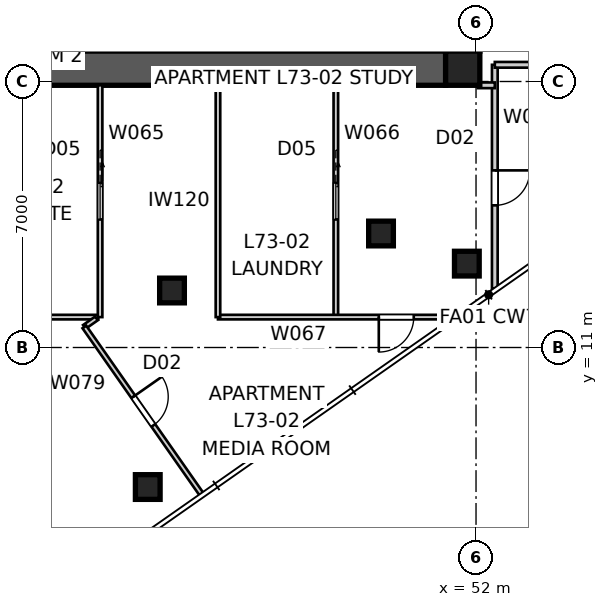
"""IFC4 building model, lengths in metres.
Left out: names, types, materials, properties, quantities, classifications, styles, units other than length and angle.
Written with IfcOpenShell. Run it as: python <this file> out.ifc"""

import sys

from ifc_helpers import new_model, si_unit, direction, frame, frame_2d, origin, origin_2d, place, context, subcontext, project, spatial, polyline, rectangle, outline, extrude, element, fill, save


model = new_model("IFC4")
c1 = context("Model", 3, precision=1e-05, world=origin(), true_north=direction((0.0, 1.0)))
c2 = subcontext(c1, "Body", "Model", "MODEL_VIEW")
j1 = project(units=[si_unit("LENGTHUNIT", "METRE"), si_unit("PLANEANGLEUNIT", "RADIAN")], contexts=[c1])
p1 = place(None, origin())
s1 = spatial("IfcSite", under=j1, at=p1, CompositionType="ELEMENT")
p2 = place(p1, origin())
s2 = spatial("IfcBuilding", under=s1, at=p2, CompositionType="ELEMENT")
p3 = place(p2, frame((0.0, 0.0, 264.2)))
s3 = spatial("IfcBuildingStorey", under=s2, at=p3, CompositionType="ELEMENT", Elevation=264.2)
p4 = place(p3, frame((51.2, 18.35, 0.0), z_axis=(0.0, 0.0, 1.0), x_axis=(-1.0, 0.0, 0.0)))
e1 = element("IfcWall", 1, at=p4, inside=s3, PredefinedType="SHEAR", context=c2, shape_type="SweptSolid", body=[
    extrude(outline(polyline([(0.0, -0.45), (22.4, -0.45), (22.4, -0.025), (22.85, -0.025), (22.85, 0.025), (22.4, 0.025), (22.4, 0.45), (0.0, 0.45), (0.0, 0.025), (-0.45, 0.025), (-0.45, -0.025), (0.0, -0.025), (0.0, -0.45)])), origin(), (0.0, 0.0, 1.0), 3.4),
])
p5 = place(p3, frame((51.65, 18.8, 0.0), z_axis=(0.0, 0.0, 1.0), x_axis=(0.0, 1.0, 0.0)))
e2 = element("IfcWall", 2, at=p5, inside=s3, PredefinedType="SHEAR", context=c2, shape_type="SweptSolid", body=[
    extrude(outline(polyline([(0.0, -0.45), (22.4, -0.45), (22.4, -0.025), (22.85, -0.025), (22.85, 0.025), (22.4, 0.025), (22.4, 0.45), (0.0, 0.45), (0.0, 0.025), (-0.45, 0.025), (-0.45, -0.025), (0.0, -0.025), (0.0, -0.45)])), origin(), (0.0, 0.0, 1.0), 3.4),
])
p6 = place(p5, frame((11.14, 0.0, 0.0)))
e3 = element("IfcOpeningElement", 3, at=p6, cuts=e2, PredefinedType="OPENING", context=c2, shape_type="SweptSolid", body=[
    extrude(rectangle(XDim=1.02, YDim=2.4, at=frame_2d((0.51, 1.2))), frame((0.0, 0.46, 0.0), z_axis=(0.0, -1.0, 0.0), x_axis=(1.0, 0.0, 0.0)), (0.0, 0.0, 1.0), 0.92),
])
p7 = place(p3, frame((51.65, 18.35, 0.0), z_axis=(0.0, 0.0, 1.0), x_axis=(1.0, 0.0, 0.0)))
e4 = element("IfcColumn", 4, at=p7, inside=s3, PredefinedType="COLUMN", context=c2, shape_type="SweptSolid", body=[
    extrude(rectangle(XDim=0.9, YDim=0.9, at=origin_2d()), origin(), (0.0, 0.0, 1.0), 3.4),
])
for number, where, z_axis, x_axis in (
    (5, (43.362, 7.328, 0.0), (0.0, 0.0, 1.0), (1.0, 0.0, 0.0)),
    (6, (51.758, 13.207, 0.0), (0.0, 0.0, 1.0), (1.0, 0.0, 0.0)),
):
    element("IfcColumn", number, at=place(p3, frame(where, z_axis=z_axis, x_axis=x_axis)), inside=s3, PredefinedType="COLUMN", context=c2, shape_type="SweptSolid", body=[
        extrude(rectangle(XDim=0.65, YDim=0.65, at=origin_2d()), origin(), (0.0, 0.0, 1.0), 3.2),
    ])
for number, where, z_axis, x_axis in (
    (7, (44.0, 12.5, 0.0), (0.0, 0.0, 1.0), (1.0, 0.0, 0.0)),
    (8, (49.5, 14.0, 0.0), (0.0, 0.0, 1.0), (1.0, 0.0, 0.0)),
):
    element("IfcColumn", number, at=place(p3, frame(where, z_axis=z_axis, x_axis=x_axis)), inside=s3, PredefinedType="COLUMN", context=c2, shape_type="SweptSolid", body=[
        extrude(rectangle(XDim=0.65, YDim=0.65, at=origin_2d()), origin(), (0.0, 0.0, 1.0), 3.4),
    ])
p8 = place(p3, frame((42.062, 11.8, 0.0), z_axis=(0.0, 0.0, 1.0), x_axis=(-1.0, 0.0, 0.0)))
e9 = element("IfcWall", 9, at=p8, inside=s3, PredefinedType="PARTITIONING", context=c2, shape_type="SweptSolid", body=[
    extrude(rectangle(XDim=7.243, YDim=0.12, at=frame_2d((3.621, 0.0))), origin(), (0.0, 0.0, 1.0), 3.2),
])
p9 = place(p3, frame((42.108, 17.9, 0.0), z_axis=(0.0, 0.0, 1.0), x_axis=(0.0, -1.0, 0.0)))
e10 = element("IfcWall", 10, at=p9, inside=s3, PredefinedType="PARTITIONING", context=c2, shape_type="SweptSolid", body=[
    extrude(rectangle(XDim=6.1, YDim=0.12, at=frame_2d((3.05, 0.0))), origin(), (0.0, 0.0, 1.0), 3.2),
])
p10 = place(p9, frame((2.57, 0.0, 0.0)))
e11 = element("IfcOpeningElement", 11, at=p10, cuts=e10, PredefinedType="OPENING", context=c2, shape_type="SweptSolid", body=[
    extrude(rectangle(XDim=0.96, YDim=2.1, at=frame_2d((0.48, 1.05))), frame((0.0, 0.07, 0.0), z_axis=(0.0, -1.0, 0.0), x_axis=(1.0, 0.0, 0.0)), (0.0, 0.0, 1.0), 0.14),
])
p11 = place(p3, frame((48.311, 17.9, 0.0), z_axis=(0.0, 0.0, 1.0), x_axis=(0.0, -1.0, 0.0)))
e12 = element("IfcWall", 12, at=p11, inside=s3, PredefinedType="PARTITIONING", context=c2, shape_type="SweptSolid", body=[
    extrude(rectangle(XDim=6.1, YDim=0.12, at=frame_2d((3.05, 0.0))), origin(), (0.0, 0.0, 1.0), 3.2),
])
p12 = place(p11, frame((2.57, 0.0, 0.0)))
e13 = element("IfcOpeningElement", 13, at=p12, cuts=e12, PredefinedType="OPENING", context=c2, shape_type="SweptSolid", body=[
    extrude(rectangle(XDim=0.96, YDim=2.1, at=frame_2d((0.48, 1.05))), frame((0.0, 0.07, 0.0), z_axis=(0.0, -1.0, 0.0), x_axis=(1.0, 0.0, 0.0)), (0.0, 0.0, 1.0), 0.14),
])
p13 = place(p3, frame((51.422, 11.8, 0.0), z_axis=(0.0, 0.0, 1.0), x_axis=(-1.0, 0.0, 0.0)))
e14 = element("IfcWall", 14, at=p13, inside=s3, PredefinedType="PARTITIONING", context=c2, shape_type="SweptSolid", body=[
    extrude(rectangle(XDim=6.213, YDim=0.12, at=frame_2d((3.106, 0.0))), origin(), (0.0, 0.0, 1.0), 3.2),
])
p14 = place(p13, frame((1.061, 0.0, 0.0)))
e15 = element("IfcOpeningElement", 15, at=p14, cuts=e14, PredefinedType="OPENING", context=c2, shape_type="SweptSolid", body=[
    extrude(rectangle(XDim=0.92, YDim=2.1, at=frame_2d((0.46, 1.05))), frame((0.0, 0.07, 0.0), z_axis=(0.0, -1.0, 0.0), x_axis=(1.0, 0.0, 0.0)), (0.0, 0.0, 1.0), 0.14),
])
p15 = place(p3, frame((45.209, 11.8, 0.0), z_axis=(0.0, 0.0, 1.0), x_axis=(0.0, 1.0, 0.0)))
e16 = element("IfcWall", 16, at=p15, inside=s3, PredefinedType="PARTITIONING", context=c2, shape_type="SweptSolid", body=[
    extrude(rectangle(XDim=6.1, YDim=0.12, at=frame_2d((3.05, 0.0))), origin(), (0.0, 0.0, 1.0), 3.2),
])
p16 = place(p3, frame((52.494, 18.439, 0.0), z_axis=(0.0, 0.0, 1.0), x_axis=(0.0, -1.0, 0.0)))
e17 = element("IfcWall", 17, at=p16, inside=s3, PredefinedType="SOLIDWALL", context=c2, shape_type="SweptSolid", body=[
    extrude(rectangle(XDim=5.888, YDim=0.15, at=frame_2d((2.944, 0.0))), origin(), (0.0, 0.0, 1.0), 3.2),
])
p17 = place(p16, frame((2.778, 0.0, 0.0)))
e18 = element("IfcOpeningElement", 18, at=p17, cuts=e17, PredefinedType="OPENING", context=c2, shape_type="SweptSolid", body=[
    extrude(rectangle(XDim=0.92, YDim=2.34, at=frame_2d((0.46, 1.17))), frame((0.0, 0.085, 0.0), z_axis=(0.0, -1.0, 0.0), x_axis=(1.0, 0.0, 0.0)), (0.0, 0.0, 1.0), 0.17),
])
p18 = place(p3, frame((52.05, 17.9, 0.0), z_axis=(0.0, 0.0, 1.0), x_axis=(1.0, 0.0, 0.0)))
e19 = element("IfcWall", 19, at=p18, inside=s3, PredefinedType="SOLIDWALL", context=c2, shape_type="SweptSolid", body=[
    extrude(rectangle(XDim=0.444, YDim=0.15, at=frame_2d((0.222, 0.0))), origin(), (0.0, 0.0, 1.0), 3.2),
])
p19 = place(p3, frame((52.494, 18.439, 0.0), z_axis=(0.0, 0.0, 1.0), x_axis=(1.0, 0.0, 0.0)))
e20 = element("IfcWall", 20, at=p19, inside=s3, PredefinedType="SOLIDWALL", context=c2, shape_type="SweptSolid", body=[
    extrude(rectangle(XDim=5.706, YDim=0.15, at=frame_2d((2.853, 0.0))), origin(), (0.0, 0.0, 1.0), 3.2),
])
p20 = place(p19, frame((2.393, 0.0, 0.0)))
e21 = element("IfcOpeningElement", 21, at=p20, cuts=e20, PredefinedType="OPENING", context=c2, shape_type="SweptSolid", body=[
    extrude(rectangle(XDim=0.92, YDim=2.34, at=frame_2d((0.46, 1.17))), frame((0.0, 0.085, 0.0), z_axis=(0.0, -1.0, 0.0), x_axis=(1.0, 0.0, 0.0)), (0.0, 0.0, 1.0), 0.17),
])
p21 = place(p3, frame((41.558, 4.893, 0.0), z_axis=(0.0, 0.0, 1.0), x_axis=(-0.573576357466, 0.819152099525, 0.0)))
e22 = element("IfcWall", 22, at=p21, inside=s3, PredefinedType="PARTITIONING", context=c2, shape_type="SweptSolid", body=[
    extrude(rectangle(XDim=8.335, YDim=0.12, at=frame_2d((4.167, 0.0))), origin(), (0.0, 0.0, 1.0), 3.2),
])
p22 = place(p21, frame((1.942, 0.0, 0.0)))
e23 = element("IfcOpeningElement", 23, at=p22, cuts=e22, PredefinedType="OPENING", context=c2, shape_type="SweptSolid", body=[
    extrude(rectangle(XDim=0.92, YDim=2.34, at=frame_2d((0.46, 1.17))), frame((0.0, 0.07, 0.0), z_axis=(0.0, -1.0, 0.0), x_axis=(1.0, 0.0, 0.0)), (0.0, 0.0, 1.0), 0.14),
])
p23 = place(p3, frame((42.012, 11.765, 0.0), z_axis=(0.0, 0.0, 1.0), x_axis=(-0.819379381292, -0.573251628444, 0.0)))
e24 = element("IfcWall", 24, at=p23, inside=s3, PredefinedType="PARTITIONING", context=c2, shape_type="SweptSolid", body=[
    extrude(rectangle(XDim=0.389, YDim=0.12, at=frame_2d((0.194, 0.0))), origin(), (0.0, 0.0, 1.0), 3.2),
])
p24 = place(p3, frame((41.693, 11.542, 0.0), z_axis=(0.0, 0.0, 1.0), x_axis=(0.573560001964, -0.819163551525, 0.0)))
e25 = element("IfcWall", 25, at=p24, inside=s3, PredefinedType="PARTITIONING", context=c2, shape_type="SweptSolid", body=[
    extrude(rectangle(XDim=5.369, YDim=0.12, at=frame_2d((2.685, 0.0))), origin(), (0.0, 0.0, 1.0), 3.2),
])
p25 = place(p24, frame((2.244, 0.0, 0.0)))
e26 = element("IfcOpeningElement", 26, at=p25, cuts=e25, PredefinedType="OPENING", context=c2, shape_type="SweptSolid", body=[
    extrude(rectangle(XDim=0.92, YDim=2.34, at=frame_2d((0.46, 1.17))), frame((0.0, 0.07, 0.0), z_axis=(0.0, -1.0, 0.0), x_axis=(1.0, 0.0, 0.0)), (0.0, 0.0, 1.0), 0.14),
])
p26 = place(p17, origin())
e27 = element("IfcDoor", 27, at=p26, inside=s3, OperationType="SINGLE_SWING_LEFT", PredefinedType="DOOR", context=c2, shape_type="SweptSolid", body=[
    extrude(rectangle(XDim=0.92, YDim=2.34, at=frame_2d((0.46, 1.17))), frame((0.0, 0.025, 0.0), z_axis=(0.0, -1.0, 0.0), x_axis=(1.0, 0.0, 0.0)), (0.0, 0.0, 1.0), 0.05),
])
fill(e18, e27)
p27 = place(p12, origin())
e28 = element("IfcDoor", 28, at=p27, inside=s3, OperationType="SLIDING_TO_LEFT", PredefinedType="DOOR", context=c2, shape_type="SweptSolid", body=[
    extrude(rectangle(XDim=0.96, YDim=2.1, at=frame_2d((0.48, 1.05))), frame((0.0, 0.025, 0.0), z_axis=(0.0, -1.0, 0.0), x_axis=(1.0, 0.0, 0.0)), (0.0, 0.0, 1.0), 0.05),
])
fill(e13, e28)
p28 = place(p14, origin())
e29 = element("IfcDoor", 29, at=p28, inside=s3, OperationType="SINGLE_SWING_RIGHT", PredefinedType="DOOR", context=c2, shape_type="SweptSolid", body=[
    extrude(rectangle(XDim=0.92, YDim=2.1, at=frame_2d((0.46, 1.05))), frame((0.0, 0.025, 0.0), z_axis=(0.0, -1.0, 0.0), x_axis=(1.0, 0.0, 0.0)), (0.0, 0.0, 1.0), 0.05),
])
fill(e15, e29)
p29 = place(p10, origin())
e30 = element("IfcDoor", 30, at=p29, inside=s3, OperationType="SLIDING_TO_LEFT", PredefinedType="DOOR", context=c2, shape_type="SweptSolid", body=[
    extrude(rectangle(XDim=0.96, YDim=2.1, at=frame_2d((0.48, 1.05))), frame((0.0, 0.025, 0.0), z_axis=(0.0, -1.0, 0.0), x_axis=(1.0, 0.0, 0.0)), (0.0, 0.0, 1.0), 0.05),
])
fill(e11, e30)
p30 = place(p25, origin())
e31 = element("IfcDoor", 31, at=p30, inside=s3, OperationType="SINGLE_SWING_LEFT", PredefinedType="DOOR", context=c2, shape_type="SweptSolid", body=[
    extrude(rectangle(XDim=0.92, YDim=2.34, at=frame_2d((0.46, 1.17))), frame((0.0, 0.025, 0.0), z_axis=(0.0, -1.0, 0.0), x_axis=(1.0, 0.0, 0.0)), (0.0, 0.0, 1.0), 0.05),
])
fill(e26, e31)
save(model, sys.argv[1])
